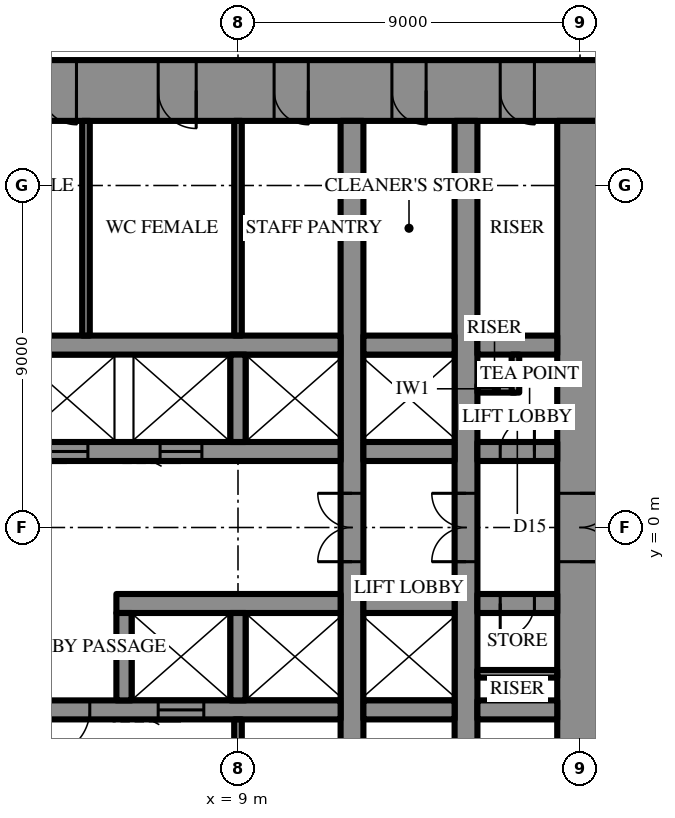
"""IFC4 building model, lengths in metres.
Left out: names, types, materials, properties, quantities, classifications, styles, units other than length and angle.
Written with IfcOpenShell. Run it as: python <this file> out.ifc"""

import sys

from ifc_helpers import new_model, si_unit, direction, frame, frame_2d, origin, place, context, subcontext, project, spatial, rectangle, extrude, element, fill, save


model = new_model("IFC4")
c1 = context("Model", 3, precision=1e-05, world=origin(), true_north=direction((0.0, 1.0)))
c2 = subcontext(c1, "Body", "Model", "MODEL_VIEW")
j1 = project(units=[si_unit("LENGTHUNIT", "METRE"), si_unit("PLANEANGLEUNIT", "RADIAN")], contexts=[c1])
p1 = place(None, origin())
s1 = spatial("IfcSite", under=j1, at=p1, CompositionType="ELEMENT")
p2 = place(p1, origin())
s2 = spatial("IfcBuilding", under=s1, at=p2, CompositionType="ELEMENT")
p3 = place(p2, frame((0.0, 0.0, 161.5)))
s3 = spatial("IfcBuildingStorey", under=s2, at=p3, CompositionType="ELEMENT", Elevation=161.5)
p4 = place(p3, frame((-18.6, 11.5, 0.0), z_axis=(0.0, 0.0, 1.0), x_axis=(1.0, 0.0, 0.0)))
e1 = element("IfcWall", 1, at=p4, inside=s3, PredefinedType="SHEAR", context=c2, shape_type="SweptSolid", body=[
    extrude(rectangle(XDim=37.2, YDim=1.6, at=frame_2d((18.6, 0.0))), origin(), (0.0, 0.0, 1.0), 4.2),
])
p5 = place(p4, frame((19.45, 0.0, 0.0)))
e2 = element("IfcOpeningElement", 2, at=p5, cuts=e1, PredefinedType="OPENING", context=c2, shape_type="SweptSolid", body=[
    extrude(rectangle(XDim=0.9, YDim=2.2, at=frame_2d((0.45, 1.1))), frame((0.0, 0.81, 0.0), z_axis=(0.0, -1.0, 0.0), x_axis=(1.0, 0.0, 0.0)), (0.0, 0.0, 1.0), 1.62),
])
p6 = place(p4, frame((22.45, 0.0, 0.0)))
e3 = element("IfcOpeningElement", 3, at=p6, cuts=e1, PredefinedType="OPENING", context=c2, shape_type="SweptSolid", body=[
    extrude(rectangle(XDim=0.9, YDim=2.2, at=frame_2d((0.45, 1.1))), frame((0.0, 0.81, 0.0), z_axis=(0.0, -1.0, 0.0), x_axis=(1.0, 0.0, 0.0)), (0.0, 0.0, 1.0), 1.62),
])
p7 = place(p4, frame((25.5, 0.0, 0.0)))
e4 = element("IfcOpeningElement", 4, at=p7, cuts=e1, PredefinedType="OPENING", context=c2, shape_type="SweptSolid", body=[
    extrude(rectangle(XDim=1.0, YDim=2.2, at=frame_2d((0.5, 1.1))), frame((0.0, 0.81, 0.0), z_axis=(0.0, -1.0, 0.0), x_axis=(1.0, 0.0, 0.0)), (0.0, 0.0, 1.0), 1.62),
])
p8 = place(p4, frame((1.8, 0.0, 0.0)))
e5 = element("IfcOpeningElement", 5, at=p8, cuts=e1, PredefinedType="OPENING", context=c2, shape_type="SweptSolid", body=[
    extrude(rectangle(XDim=0.9, YDim=2.2, at=frame_2d((0.45, 1.1))), frame((0.0, 0.81, 0.0), z_axis=(0.0, -1.0, 0.0), x_axis=(1.0, 0.0, 0.0)), (0.0, 0.0, 1.0), 1.62),
])
p9 = place(p4, frame((4.65, 0.0, 0.0)))
e6 = element("IfcOpeningElement", 6, at=p9, cuts=e1, PredefinedType="OPENING", context=c2, shape_type="SweptSolid", body=[
    extrude(rectangle(XDim=0.9, YDim=2.2, at=frame_2d((0.45, 1.1))), frame((0.0, 0.81, 0.0), z_axis=(0.0, -1.0, 0.0), x_axis=(1.0, 0.0, 0.0)), (0.0, 0.0, 1.0), 1.62),
])
p10 = place(p4, frame((7.75, 0.0, 0.0)))
e7 = element("IfcOpeningElement", 7, at=p10, cuts=e1, PredefinedType="OPENING", context=c2, shape_type="SweptSolid", body=[
    extrude(rectangle(XDim=0.9, YDim=2.2, at=frame_2d((0.45, 1.1))), frame((0.0, 0.81, 0.0), z_axis=(0.0, -1.0, 0.0), x_axis=(1.0, 0.0, 0.0)), (0.0, 0.0, 1.0), 1.62),
])
p11 = place(p4, frame((28.55, 0.0, 0.0)))
e8 = element("IfcOpeningElement", 8, at=p11, cuts=e1, PredefinedType="OPENING", context=c2, shape_type="SweptSolid", body=[
    extrude(rectangle(XDim=0.9, YDim=2.2, at=frame_2d((0.45, 1.1))), frame((0.0, 0.81, 0.0), z_axis=(0.0, -1.0, 0.0), x_axis=(1.0, 0.0, 0.0)), (0.0, 0.0, 1.0), 1.62),
])
p12 = place(p4, frame((31.65, 0.0, 0.0)))
e9 = element("IfcOpeningElement", 9, at=p12, cuts=e1, PredefinedType="OPENING", context=c2, shape_type="SweptSolid", body=[
    extrude(rectangle(XDim=0.9, YDim=2.2, at=frame_2d((0.45, 1.1))), frame((0.0, 0.81, 0.0), z_axis=(0.0, -1.0, 0.0), x_axis=(1.0, 0.0, 0.0)), (0.0, 0.0, 1.0), 1.62),
])
p13 = place(p4, frame((34.5, 0.0, 0.0)))
e10 = element("IfcOpeningElement", 10, at=p13, cuts=e1, PredefinedType="OPENING", context=c2, shape_type="SweptSolid", body=[
    extrude(rectangle(XDim=0.9, YDim=2.2, at=frame_2d((0.45, 1.1))), frame((0.0, 0.81, 0.0), z_axis=(0.0, -1.0, 0.0), x_axis=(1.0, 0.0, 0.0)), (0.0, 0.0, 1.0), 1.62),
])
p14 = place(p3, frame((18.0, -10.7, 0.0), z_axis=(0.0, 0.0, 1.0), x_axis=(0.0, 1.0, 0.0)))
e11 = element("IfcWall", 11, at=p14, inside=s3, PredefinedType="SHEAR", context=c2, shape_type="SweptSolid", body=[
    extrude(rectangle(XDim=21.4, YDim=1.2, at=frame_2d((10.7, 0.0))), origin(), (0.0, 0.0, 1.0), 4.2),
])
p15 = place(p14, frame((9.8, 0.0, 0.0)))
e12 = element("IfcOpeningElement", 12, at=p15, cuts=e11, PredefinedType="OPENING", context=c2, shape_type="SweptSolid", body=[
    extrude(rectangle(XDim=1.8, YDim=2.4, at=frame_2d((0.9, 1.2))), frame((0.0, 0.61, 0.0), z_axis=(0.0, -1.0, 0.0), x_axis=(1.0, 0.0, 0.0)), (0.0, 0.0, 1.0), 1.22),
])
p16 = place(p3, frame((12.0, -10.7, 0.0), z_axis=(0.0, 0.0, 1.0), x_axis=(0.0, 1.0, 0.0)))
e13 = element("IfcWall", 13, at=p16, inside=s3, PredefinedType="SHEAR", context=c2, shape_type="SweptSolid", body=[
    extrude(rectangle(XDim=21.4, YDim=0.6, at=frame_2d((10.7, 0.0))), origin(), (0.0, 0.0, 1.0), 4.2),
])
p17 = place(p16, frame((9.8, 0.0, 0.0)))
e14 = element("IfcOpeningElement", 14, at=p17, cuts=e13, PredefinedType="OPENING", context=c2, shape_type="SweptSolid", body=[
    extrude(rectangle(XDim=1.8, YDim=2.4, at=frame_2d((0.9, 1.2))), frame((0.0, 0.31, 0.0), z_axis=(0.0, -1.0, 0.0), x_axis=(1.0, 0.0, 0.0)), (0.0, 0.0, 1.0), 0.62),
])
p18 = place(p3, frame((15.0, -10.7, 0.0), z_axis=(0.0, 0.0, 1.0), x_axis=(0.0, 1.0, 0.0)))
e15 = element("IfcWall", 15, at=p18, inside=s3, PredefinedType="SHEAR", context=c2, shape_type="SweptSolid", body=[
    extrude(rectangle(XDim=21.4, YDim=0.6, at=frame_2d((10.7, 0.0))), origin(), (0.0, 0.0, 1.0), 4.2),
])
p19 = place(p18, frame((9.8, 0.0, 0.0)))
e16 = element("IfcOpeningElement", 16, at=p19, cuts=e15, PredefinedType="OPENING", context=c2, shape_type="SweptSolid", body=[
    extrude(rectangle(XDim=1.8, YDim=2.4, at=frame_2d((0.9, 1.2))), frame((0.0, 0.31, 0.0), z_axis=(0.0, -1.0, 0.0), x_axis=(1.0, 0.0, 0.0)), (0.0, 0.0, 1.0), 0.62),
])
p20 = place(p3, frame((-3.2, 2.0, 0.0), z_axis=(0.0, 0.0, 1.0), x_axis=(1.0, 0.0, 0.0)))
e17 = element("IfcWall", 17, at=p20, inside=s3, PredefinedType="SHEAR", context=c2, shape_type="SweptSolid", body=[
    extrude(rectangle(XDim=14.9, YDim=0.5, at=frame_2d((7.45, 0.0))), origin(), (0.0, 0.0, 1.0), 4.2),
])
p21 = place(p20, frame((1.15, 0.0, 0.0)))
e18 = element("IfcOpeningElement", 18, at=p21, cuts=e17, PredefinedType="OPENING", context=c2, shape_type="SweptSolid", body=[
    extrude(rectangle(XDim=1.1, YDim=2.2, at=frame_2d((0.55, 1.1))), frame((0.0, 0.26, 0.0), z_axis=(0.0, -1.0, 0.0), x_axis=(1.0, 0.0, 0.0)), (0.0, 0.0, 1.0), 0.52),
])
p22 = place(p20, frame((4.15, 0.0, 0.0)))
e19 = element("IfcOpeningElement", 19, at=p22, cuts=e17, PredefinedType="OPENING", context=c2, shape_type="SweptSolid", body=[
    extrude(rectangle(XDim=1.1, YDim=2.2, at=frame_2d((0.55, 1.1))), frame((0.0, 0.26, 0.0), z_axis=(0.0, -1.0, 0.0), x_axis=(1.0, 0.0, 0.0)), (0.0, 0.0, 1.0), 0.52),
])
p23 = place(p20, frame((7.15, 0.0, 0.0)))
e20 = element("IfcOpeningElement", 20, at=p23, cuts=e17, PredefinedType="OPENING", context=c2, shape_type="SweptSolid", body=[
    extrude(rectangle(XDim=1.1, YDim=2.2, at=frame_2d((0.55, 1.1))), frame((0.0, 0.26, 0.0), z_axis=(0.0, -1.0, 0.0), x_axis=(1.0, 0.0, 0.0)), (0.0, 0.0, 1.0), 0.52),
])
p24 = place(p20, frame((10.15, 0.0, 0.0)))
e21 = element("IfcOpeningElement", 21, at=p24, cuts=e17, PredefinedType="OPENING", context=c2, shape_type="SweptSolid", body=[
    extrude(rectangle(XDim=1.1, YDim=2.2, at=frame_2d((0.55, 1.1))), frame((0.0, 0.26, 0.0), z_axis=(0.0, -1.0, 0.0), x_axis=(1.0, 0.0, 0.0)), (0.0, 0.0, 1.0), 0.52),
])
p25 = place(p3, frame((12.3, 2.0, 0.0), z_axis=(0.0, 0.0, 1.0), x_axis=(1.0, 0.0, 0.0)))
e22 = element("IfcWall", 22, at=p25, inside=s3, PredefinedType="SHEAR", context=c2, shape_type="SweptSolid", body=[
    extrude(rectangle(XDim=2.4, YDim=0.5, at=frame_2d((1.2, 0.0))), origin(), (0.0, 0.0, 1.0), 4.2),
])
p26 = place(p3, frame((15.3, 2.0, 0.0), z_axis=(0.0, 0.0, 1.0), x_axis=(1.0, 0.0, 0.0)))
e23 = element("IfcWall", 23, at=p26, inside=s3, PredefinedType="SHEAR", context=c2, shape_type="SweptSolid", body=[
    extrude(rectangle(XDim=2.1, YDim=0.5, at=frame_2d((1.05, 0.0))), origin(), (0.0, 0.0, 1.0), 4.2),
])
p27 = place(p26, frame((0.6, 0.0, 0.0)))
e24 = element("IfcOpeningElement", 24, at=p27, cuts=e23, PredefinedType="OPENING", context=c2, shape_type="SweptSolid", body=[
    extrude(rectangle(XDim=0.9, YDim=2.2, at=frame_2d((0.45, 1.1))), frame((0.0, 0.26, 0.0), z_axis=(0.0, -1.0, 0.0), x_axis=(1.0, 0.0, 0.0)), (0.0, 0.0, 1.0), 0.52),
])
p28 = place(p3, frame((-11.7, 4.8, 0.0), z_axis=(0.0, 0.0, 1.0), x_axis=(1.0, 0.0, 0.0)))
e25 = element("IfcWall", 25, at=p28, inside=s3, PredefinedType="SHEAR", context=c2, shape_type="SweptSolid", body=[
    extrude(rectangle(XDim=23.4, YDim=0.5, at=frame_2d((11.7, 0.0))), origin(), (0.0, 0.0, 1.0), 4.2),
])
p29 = place(p28, frame((6.6, 0.0, 0.0)))
e26 = element("IfcOpeningElement", 26, at=p29, cuts=e25, PredefinedType="OPENING", context=c2, shape_type="SweptSolid", body=[
    extrude(rectangle(XDim=1.2, YDim=2.2, at=frame_2d((0.6, 1.1))), frame((0.0, 0.26, 0.0), z_axis=(0.0, -1.0, 0.0), x_axis=(1.0, 0.0, 0.0)), (0.0, 0.0, 1.0), 0.52),
])
p30 = place(p28, frame((3.6, 0.0, 0.0)))
e27 = element("IfcOpeningElement", 27, at=p30, cuts=e25, PredefinedType="OPENING", context=c2, shape_type="SweptSolid", body=[
    extrude(rectangle(XDim=1.2, YDim=2.2, at=frame_2d((0.6, 1.1))), frame((0.0, 0.26, 0.0), z_axis=(0.0, -1.0, 0.0), x_axis=(1.0, 0.0, 0.0)), (0.0, 0.0, 1.0), 0.52),
])
p31 = place(p3, frame((12.3, 4.8, 0.0), z_axis=(0.0, 0.0, 1.0), x_axis=(1.0, 0.0, 0.0)))
e28 = element("IfcWall", 28, at=p31, inside=s3, PredefinedType="SHEAR", context=c2, shape_type="SweptSolid", body=[
    extrude(rectangle(XDim=2.4, YDim=0.5, at=frame_2d((1.2, 0.0))), origin(), (0.0, 0.0, 1.0), 4.2),
])
p32 = place(p3, frame((15.3, 4.8, 0.0), z_axis=(0.0, 0.0, 1.0), x_axis=(1.0, 0.0, 0.0)))
e29 = element("IfcWall", 29, at=p32, inside=s3, PredefinedType="SHEAR", context=c2, shape_type="SweptSolid", body=[
    extrude(rectangle(XDim=2.1, YDim=0.5, at=frame_2d((1.05, 0.0))), origin(), (0.0, 0.0, 1.0), 4.2),
])
p33 = place(p3, frame((9.0, 2.25, 0.0), z_axis=(0.0, 0.0, 1.0), x_axis=(0.0, 1.0, 0.0)))
e30 = element("IfcWall", 30, at=p33, inside=s3, PredefinedType="SHEAR", context=c2, shape_type="SweptSolid", body=[
    extrude(rectangle(XDim=2.3, YDim=0.4, at=frame_2d((1.15, 0.0))), origin(), (0.0, 0.0, 1.0), 4.2),
])
p34 = place(p3, frame((17.4, -2.0, 0.0), z_axis=(0.0, 0.0, 1.0), x_axis=(-1.0, 0.0, 0.0)))
e31 = element("IfcWall", 31, at=p34, inside=s3, PredefinedType="SHEAR", context=c2, shape_type="SweptSolid", body=[
    extrude(rectangle(XDim=2.1, YDim=0.5, at=frame_2d((1.05, 0.0))), origin(), (0.0, 0.0, 1.0), 4.2),
])
p35 = place(p34, frame((0.6, 0.0, 0.0)))
e32 = element("IfcOpeningElement", 32, at=p35, cuts=e31, PredefinedType="OPENING", context=c2, shape_type="SweptSolid", body=[
    extrude(rectangle(XDim=0.9, YDim=2.2, at=frame_2d((0.45, 1.1))), frame((0.0, 0.26, 0.0), z_axis=(0.0, -1.0, 0.0), x_axis=(1.0, 0.0, 0.0)), (0.0, 0.0, 1.0), 0.52),
])
p36 = place(p3, frame((14.7, -2.0, 0.0), z_axis=(0.0, 0.0, 1.0), x_axis=(-1.0, 0.0, 0.0)))
e33 = element("IfcWall", 33, at=p36, inside=s3, PredefinedType="SHEAR", context=c2, shape_type="SweptSolid", body=[
    extrude(rectangle(XDim=2.4, YDim=0.5, at=frame_2d((1.2, 0.0))), origin(), (0.0, 0.0, 1.0), 4.2),
])
p37 = place(p3, frame((11.7, -2.0, 0.0), z_axis=(0.0, 0.0, 1.0), x_axis=(-1.0, 0.0, 0.0)))
e34 = element("IfcWall", 34, at=p37, inside=s3, PredefinedType="SHEAR", context=c2, shape_type="SweptSolid", body=[
    extrude(rectangle(XDim=5.9, YDim=0.5, at=frame_2d((2.95, 0.0))), origin(), (0.0, 0.0, 1.0), 4.2),
])
p38 = place(p3, frame((17.4, -4.8, 0.0), z_axis=(0.0, 0.0, 1.0), x_axis=(-1.0, 0.0, 0.0)))
e35 = element("IfcWall", 35, at=p38, inside=s3, PredefinedType="SHEAR", context=c2, shape_type="SweptSolid", body=[
    extrude(rectangle(XDim=2.1, YDim=0.5, at=frame_2d((1.05, 0.0))), origin(), (0.0, 0.0, 1.0), 4.2),
])
p39 = place(p3, frame((14.7, -4.8, 0.0), z_axis=(0.0, 0.0, 1.0), x_axis=(-1.0, 0.0, 0.0)))
e36 = element("IfcWall", 36, at=p39, inside=s3, PredefinedType="SHEAR", context=c2, shape_type="SweptSolid", body=[
    extrude(rectangle(XDim=2.4, YDim=0.5, at=frame_2d((1.2, 0.0))), origin(), (0.0, 0.0, 1.0), 4.2),
])
p40 = place(p3, frame((11.7, -4.8, 0.0), z_axis=(0.0, 0.0, 1.0), x_axis=(-1.0, 0.0, 0.0)))
e37 = element("IfcWall", 37, at=p40, inside=s3, PredefinedType="SHEAR", context=c2, shape_type="SweptSolid", body=[
    extrude(rectangle(XDim=23.4, YDim=0.5, at=frame_2d((11.7, 0.0))), origin(), (0.0, 0.0, 1.0), 4.2),
])
p41 = place(p40, frame((6.6, 0.0, 0.0)))
e38 = element("IfcOpeningElement", 38, at=p41, cuts=e37, PredefinedType="OPENING", context=c2, shape_type="SweptSolid", body=[
    extrude(rectangle(XDim=1.2, YDim=2.2, at=frame_2d((0.6, 1.1))), frame((0.0, 0.26, 0.0), z_axis=(0.0, -1.0, 0.0), x_axis=(1.0, 0.0, 0.0)), (0.0, 0.0, 1.0), 0.52),
])
p42 = place(p40, frame((3.6, 0.0, 0.0)))
e39 = element("IfcOpeningElement", 39, at=p42, cuts=e37, PredefinedType="OPENING", context=c2, shape_type="SweptSolid", body=[
    extrude(rectangle(XDim=1.2, YDim=2.2, at=frame_2d((0.6, 1.1))), frame((0.0, 0.26, 0.0), z_axis=(0.0, -1.0, 0.0), x_axis=(1.0, 0.0, 0.0)), (0.0, 0.0, 1.0), 0.52),
])
for number, where, z_axis, x_axis in (
    (40, (9.0, -2.25, 0.0), (0.0, 0.0, 1.0), (0.0, -1.0, 0.0)),
    (41, (6.0, -2.25, 0.0), (0.0, 0.0, 1.0), (0.0, -1.0, 0.0)),
):
    element("IfcWall", number, at=place(p3, frame(where, z_axis=z_axis, x_axis=x_axis)), inside=s3, PredefinedType="SHEAR", context=c2, shape_type="SweptSolid", body=[
        extrude(rectangle(XDim=2.3, YDim=0.4, at=frame_2d((1.15, 0.0))), origin(), (0.0, 0.0, 1.0), 4.2),
    ])
for number, where, z_axis, x_axis in (
    (42, (9.0, 5.05, 0.0), (0.0, 0.0, 1.0), (0.0, 1.0, 0.0)),
    (43, (5.0, 5.05, 0.0), (0.0, 0.0, 1.0), (0.0, 1.0, 0.0)),
    (44, (9.0, -5.05, 0.0), (0.0, 0.0, 1.0), (0.0, -1.0, 0.0)),
):
    element("IfcWall", number, at=place(p3, frame(where, z_axis=z_axis, x_axis=x_axis)), inside=s3, PredefinedType="PARTITIONING", context=c2, shape_type="SweptSolid", body=[
        extrude(rectangle(XDim=5.65, YDim=0.2, at=frame_2d((2.825, 0.0))), origin(), (0.0, 0.0, 1.0), 4.0),
    ])
for number, where, z_axis, x_axis in (
    (45, (15.3, 3.65, 0.0), (0.0, 0.0, 1.0), (1.0, 0.0, 0.0)),
    (46, (16.3, 3.55, 0.0), (0.0, 0.0, 1.0), (0.0, 1.0, 0.0)),
):
    element("IfcWall", number, at=place(p3, frame(where, z_axis=z_axis, x_axis=x_axis)), inside=s3, PredefinedType="PARTITIONING", context=c2, shape_type="SweptSolid", body=[
        extrude(rectangle(XDim=1.0, YDim=0.2, at=frame_2d((0.5, 0.0))), origin(), (0.0, 0.0, 1.0), 4.0),
    ])
p43 = place(p3, frame((17.4, -3.85, 0.0), z_axis=(0.0, 0.0, 1.0), x_axis=(-1.0, 0.0, 0.0)))
e47 = element("IfcWall", 47, at=p43, inside=s3, PredefinedType="PARTITIONING", context=c2, shape_type="SweptSolid", body=[
    extrude(rectangle(XDim=2.1, YDim=0.2, at=frame_2d((1.05, 0.0))), origin(), (0.0, 0.0, 1.0), 4.0),
])
p44 = place(p15, frame((1.8, 0.0, 0.0), z_axis=(0.0, 0.0, 1.0), x_axis=(-1.0, 0.0, 0.0)))
e48 = element("IfcDoor", 48, at=p44, inside=s3, OperationType="DOUBLE_DOOR_SINGLE_SWING", PredefinedType="DOOR", context=c2, shape_type="SweptSolid", body=[
    extrude(rectangle(XDim=1.8, YDim=2.4, at=frame_2d((0.9, 1.2))), frame((0.0, 0.025, 0.0), z_axis=(0.0, -1.0, 0.0), x_axis=(1.0, 0.0, 0.0)), (0.0, 0.0, 1.0), 0.05),
])
fill(e12, e48)
p45 = place(p6, frame((0.9, 0.0, 0.0), z_axis=(0.0, 0.0, 1.0), x_axis=(-1.0, 0.0, 0.0)))
e49 = element("IfcDoor", 49, at=p45, inside=s3, OperationType="SINGLE_SWING_RIGHT", PredefinedType="DOOR", context=c2, shape_type="SweptSolid", body=[
    extrude(rectangle(XDim=0.9, YDim=2.2, at=frame_2d((0.45, 1.1))), frame((0.0, 0.025, 0.0), z_axis=(0.0, -1.0, 0.0), x_axis=(1.0, 0.0, 0.0)), (0.0, 0.0, 1.0), 0.05),
])
fill(e3, e49)
p46 = place(p7, frame((1.0, 0.0, 0.0), z_axis=(0.0, 0.0, 1.0), x_axis=(-1.0, 0.0, 0.0)))
e50 = element("IfcDoor", 50, at=p46, inside=s3, OperationType="SINGLE_SWING_RIGHT", PredefinedType="DOOR", context=c2, shape_type="SweptSolid", body=[
    extrude(rectangle(XDim=1.0, YDim=2.2, at=frame_2d((0.5, 1.1))), frame((0.0, 0.025, 0.0), z_axis=(0.0, -1.0, 0.0), x_axis=(1.0, 0.0, 0.0)), (0.0, 0.0, 1.0), 0.05),
])
fill(e4, e50)
p47 = place(p11, frame((0.9, 0.0, 0.0), z_axis=(0.0, 0.0, 1.0), x_axis=(-1.0, 0.0, 0.0)))
e51 = element("IfcDoor", 51, at=p47, inside=s3, OperationType="SINGLE_SWING_RIGHT", PredefinedType="DOOR", context=c2, shape_type="SweptSolid", body=[
    extrude(rectangle(XDim=0.9, YDim=2.2, at=frame_2d((0.45, 1.1))), frame((0.0, 0.025, 0.0), z_axis=(0.0, -1.0, 0.0), x_axis=(1.0, 0.0, 0.0)), (0.0, 0.0, 1.0), 0.05),
])
fill(e8, e51)
p48 = place(p12, frame((0.9, 0.0, 0.0), z_axis=(0.0, 0.0, 1.0), x_axis=(-1.0, 0.0, 0.0)))
e52 = element("IfcDoor", 52, at=p48, inside=s3, OperationType="SINGLE_SWING_RIGHT", PredefinedType="DOOR", context=c2, shape_type="SweptSolid", body=[
    extrude(rectangle(XDim=0.9, YDim=2.2, at=frame_2d((0.45, 1.1))), frame((0.0, 0.025, 0.0), z_axis=(0.0, -1.0, 0.0), x_axis=(1.0, 0.0, 0.0)), (0.0, 0.0, 1.0), 0.05),
])
fill(e9, e52)
p49 = place(p13, frame((0.9, 0.0, 0.0), z_axis=(0.0, 0.0, 1.0), x_axis=(-1.0, 0.0, 0.0)))
e53 = element("IfcDoor", 53, at=p49, inside=s3, OperationType="SINGLE_SWING_RIGHT", PredefinedType="DOOR", context=c2, shape_type="SweptSolid", body=[
    extrude(rectangle(XDim=0.9, YDim=2.2, at=frame_2d((0.45, 1.1))), frame((0.0, 0.025, 0.0), z_axis=(0.0, -1.0, 0.0), x_axis=(1.0, 0.0, 0.0)), (0.0, 0.0, 1.0), 0.05),
])
fill(e10, e53)
p50 = place(p41, origin())
e54 = element("IfcDoor", 54, at=p50, inside=s3, OperationType="SINGLE_SWING_LEFT", PredefinedType="DOOR", context=c2, shape_type="SweptSolid", body=[
    extrude(rectangle(XDim=1.2, YDim=2.2, at=frame_2d((0.6, 1.1))), frame((0.0, 0.025, 0.0), z_axis=(0.0, -1.0, 0.0), x_axis=(1.0, 0.0, 0.0)), (0.0, 0.0, 1.0), 0.05),
])
fill(e38, e54)
p51 = place(p27, origin())
e55 = element("IfcDoor", 55, at=p51, inside=s3, OperationType="SINGLE_SWING_LEFT", PredefinedType="DOOR", context=c2, shape_type="SweptSolid", body=[
    extrude(rectangle(XDim=0.9, YDim=2.2, at=frame_2d((0.45, 1.1))), frame((0.0, 0.025, 0.0), z_axis=(0.0, -1.0, 0.0), x_axis=(1.0, 0.0, 0.0)), (0.0, 0.0, 1.0), 0.05),
])
fill(e24, e55)
p52 = place(p35, origin())
e56 = element("IfcDoor", 56, at=p52, inside=s3, OperationType="SINGLE_SWING_LEFT", PredefinedType="DOOR", context=c2, shape_type="SweptSolid", body=[
    extrude(rectangle(XDim=0.9, YDim=2.2, at=frame_2d((0.45, 1.1))), frame((0.0, 0.025, 0.0), z_axis=(0.0, -1.0, 0.0), x_axis=(1.0, 0.0, 0.0)), (0.0, 0.0, 1.0), 0.05),
])
fill(e32, e56)
p53 = place(p17, origin())
e57 = element("IfcDoor", 57, at=p53, inside=s3, OperationType="DOUBLE_DOOR_SINGLE_SWING", PredefinedType="DOOR", context=c2, shape_type="SweptSolid", body=[
    extrude(rectangle(XDim=1.8, YDim=2.4, at=frame_2d((0.9, 1.2))), frame((0.0, 0.025, 0.0), z_axis=(0.0, -1.0, 0.0), x_axis=(1.0, 0.0, 0.0)), (0.0, 0.0, 1.0), 0.05),
])
fill(e14, e57)
p54 = place(p19, origin())
e58 = element("IfcDoor", 58, at=p54, inside=s3, OperationType="DOUBLE_DOOR_SINGLE_SWING", PredefinedType="DOOR", context=c2, shape_type="SweptSolid", body=[
    extrude(rectangle(XDim=1.8, YDim=2.4, at=frame_2d((0.9, 1.2))), frame((0.0, 0.025, 0.0), z_axis=(0.0, -1.0, 0.0), x_axis=(1.0, 0.0, 0.0)), (0.0, 0.0, 1.0), 0.05),
])
fill(e16, e58)
p55 = place(p23, frame((1.1, 0.0, 0.0), z_axis=(0.0, 0.0, 1.0), x_axis=(-1.0, 0.0, 0.0)))
e59 = element("IfcDoor", 59, at=p55, inside=s3, OperationType="SLIDING_TO_LEFT", PredefinedType="DOOR", context=c2, shape_type="SweptSolid", body=[
    extrude(rectangle(XDim=1.1, YDim=2.2, at=frame_2d((0.55, 1.1))), frame((0.0, 0.025, 0.0), z_axis=(0.0, -1.0, 0.0), x_axis=(1.0, 0.0, 0.0)), (0.0, 0.0, 1.0), 0.05),
])
fill(e20, e59)
p56 = place(p24, frame((1.1, 0.0, 0.0), z_axis=(0.0, 0.0, 1.0), x_axis=(-1.0, 0.0, 0.0)))
e60 = element("IfcDoor", 60, at=p56, inside=s3, OperationType="SLIDING_TO_LEFT", PredefinedType="DOOR", context=c2, shape_type="SweptSolid", body=[
    extrude(rectangle(XDim=1.1, YDim=2.2, at=frame_2d((0.55, 1.1))), frame((0.0, 0.025, 0.0), z_axis=(0.0, -1.0, 0.0), x_axis=(1.0, 0.0, 0.0)), (0.0, 0.0, 1.0), 0.05),
])
fill(e21, e60)
p57 = place(p42, origin())
e61 = element("IfcDoor", 61, at=p57, inside=s3, OperationType="SLIDING_TO_LEFT", PredefinedType="DOOR", context=c2, shape_type="SweptSolid", body=[
    extrude(rectangle(XDim=1.2, YDim=2.2, at=frame_2d((0.6, 1.1))), frame((0.0, 0.025, 0.0), z_axis=(0.0, -1.0, 0.0), x_axis=(1.0, 0.0, 0.0)), (0.0, 0.0, 1.0), 0.05),
])
fill(e39, e61)
save(model, sys.argv[1])
